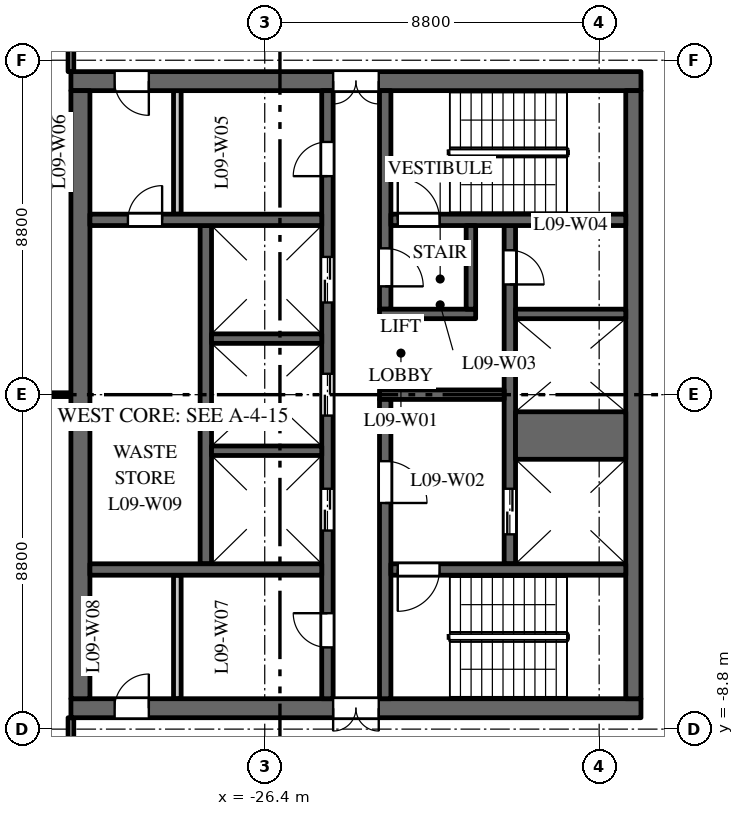
"""IFC4 building model, lengths in metres.
Left out: names, types, materials, properties, quantities, classifications, styles, units other than length and angle.
Written with IfcOpenShell. Run it as: python <this file> out.ifc"""

import sys

from ifc_helpers import new_model, si_unit, direction, frame, frame_2d, origin, place, context, subcontext, project, spatial, rectangle, extrude, element, fill, save


model = new_model("IFC4")
c1 = context("Model", 3, precision=1e-05, world=origin(), true_north=direction((0.0, 1.0)))
c2 = subcontext(c1, "Body", "Model", "MODEL_VIEW")
j1 = project(units=[si_unit("LENGTHUNIT", "METRE"), si_unit("PLANEANGLEUNIT", "RADIAN")], contexts=[c1])
p1 = place(None, origin())
s1 = spatial("IfcSite", under=j1, at=p1, CompositionType="ELEMENT")
p2 = place(p1, origin())
s2 = spatial("IfcBuilding", under=s1, at=p2, CompositionType="ELEMENT")
p3 = place(p2, frame((0.0, 0.0, 46.5)))
s3 = spatial("IfcBuildingStorey", under=s2, at=p3, CompositionType="ELEMENT", Elevation=46.5)
p4 = place(p3, frame((-16.5, 8.25, 0.0), z_axis=(0.0, 0.0, 1.0), x_axis=(-1.0, 0.0, 0.0)))
e1 = element("IfcWall", 1, at=p4, inside=s3, PredefinedType="SHEAR", context=c2, shape_type="SweptSolid", body=[
    extrude(rectangle(XDim=15.0, YDim=0.5, at=frame_2d((7.5, 0.0))), origin(), (0.0, 0.0, 1.0), 3.7),
])
p5 = place(p4, frame((6.9, 0.0, 0.0)))
e2 = element("IfcOpeningElement", 2, at=p5, cuts=e1, PredefinedType="OPENING", context=c2, shape_type="SweptSolid", body=[
    extrude(rectangle(XDim=1.2, YDim=2.1, at=frame_2d((0.6, 1.05))), frame((0.0, 0.26, 0.0), z_axis=(0.0, -1.0, 0.0), x_axis=(1.0, 0.0, 0.0)), (0.0, 0.0, 1.0), 0.52),
])
p6 = place(p4, frame((12.95, 0.0, 0.0)))
e3 = element("IfcOpeningElement", 3, at=p6, cuts=e1, PredefinedType="OPENING", context=c2, shape_type="SweptSolid", body=[
    extrude(rectangle(XDim=0.9, YDim=2.1, at=frame_2d((0.45, 1.05))), frame((0.0, 0.26, 0.0), z_axis=(0.0, -1.0, 0.0), x_axis=(1.0, 0.0, 0.0)), (0.0, 0.0, 1.0), 0.52),
])
p7 = place(p3, frame((-16.5, -8.25, 0.0), z_axis=(0.0, 0.0, 1.0), x_axis=(-1.0, 0.0, 0.0)))
e4 = element("IfcWall", 4, at=p7, inside=s3, PredefinedType="SHEAR", context=c2, shape_type="SweptSolid", body=[
    extrude(rectangle(XDim=15.0, YDim=0.5, at=frame_2d((7.5, 0.0))), origin(), (0.0, 0.0, 1.0), 3.7),
])
p8 = place(p7, frame((6.9, 0.0, 0.0)))
e5 = element("IfcOpeningElement", 5, at=p8, cuts=e4, PredefinedType="OPENING", context=c2, shape_type="SweptSolid", body=[
    extrude(rectangle(XDim=1.2, YDim=2.1, at=frame_2d((0.6, 1.05))), frame((0.0, 0.26, 0.0), z_axis=(0.0, -1.0, 0.0), x_axis=(1.0, 0.0, 0.0)), (0.0, 0.0, 1.0), 0.52),
])
p9 = place(p7, frame((12.95, 0.0, 0.0)))
e6 = element("IfcOpeningElement", 6, at=p9, cuts=e4, PredefinedType="OPENING", context=c2, shape_type="SweptSolid", body=[
    extrude(rectangle(XDim=0.9, YDim=2.1, at=frame_2d((0.45, 1.05))), frame((0.0, 0.26, 0.0), z_axis=(0.0, -1.0, 0.0), x_axis=(1.0, 0.0, 0.0)), (0.0, 0.0, 1.0), 0.52),
])
p10 = place(p3, frame((-27.95, -4.45, 0.0), z_axis=(0.0, 0.0, 1.0), x_axis=(0.0, 1.0, 0.0)))
e7 = element("IfcWall", 7, at=p10, inside=s3, PredefinedType="SHEAR", context=c2, shape_type="SweptSolid", body=[
    extrude(rectangle(XDim=8.9, YDim=0.3, at=frame_2d((4.45, 0.0))), origin(), (0.0, 0.0, 1.0), 3.7),
])
p11 = place(p3, frame((-19.95, -4.45, 0.0), z_axis=(0.0, 0.0, 1.0), x_axis=(0.0, 1.0, 0.0)))
e8 = element("IfcWall", 8, at=p11, inside=s3, PredefinedType="SHEAR", context=c2, shape_type="SweptSolid", body=[
    extrude(rectangle(XDim=8.9, YDim=0.3, at=frame_2d((4.45, 0.0))), origin(), (0.0, 0.0, 1.0), 3.7),
])
p12 = place(p11, frame((0.775, 0.0, 0.0)))
e9 = element("IfcOpeningElement", 9, at=p12, cuts=e8, PredefinedType="OPENING", context=c2, shape_type="SweptSolid", body=[
    extrude(rectangle(XDim=1.2, YDim=2.1, at=frame_2d((0.6, 1.05))), frame((0.0, 0.16, 0.0), z_axis=(0.0, -1.0, 0.0), x_axis=(1.0, 0.0, 0.0)), (0.0, 0.0, 1.0), 0.32),
])
p13 = place(p11, frame((7.35, 0.0, 0.0)))
e10 = element("IfcOpeningElement", 10, at=p13, cuts=e8, PredefinedType="OPENING", context=c2, shape_type="SweptSolid", body=[
    extrude(rectangle(XDim=0.9, YDim=2.1, at=frame_2d((0.45, 1.05))), frame((0.0, 0.16, 0.0), z_axis=(0.0, -1.0, 0.0), x_axis=(1.0, 0.0, 0.0)), (0.0, 0.0, 1.0), 0.32),
])
p14 = place(p3, frame((-24.75, -8.0, 0.0), z_axis=(0.0, 0.0, 1.0), x_axis=(0.0, 1.0, 0.0)))
e11 = element("IfcWall", 11, at=p14, inside=s3, PredefinedType="SHEAR", context=c2, shape_type="SweptSolid", body=[
    extrude(rectangle(XDim=16.0, YDim=0.3, at=frame_2d((8.0, 0.0))), origin(), (0.0, 0.0, 1.0), 3.7),
])
p15 = place(p14, frame((4.425, 0.0, 0.0)))
e12 = element("IfcOpeningElement", 12, at=p15, cuts=e11, PredefinedType="OPENING", context=c2, shape_type="SweptSolid", body=[
    extrude(rectangle(XDim=1.1, YDim=2.1, at=frame_2d((0.55, 1.05))), frame((0.0, 0.16, 0.0), z_axis=(0.0, -1.0, 0.0), x_axis=(1.0, 0.0, 0.0)), (0.0, 0.0, 1.0), 0.32),
])
p16 = place(p14, frame((7.45, 0.0, 0.0)))
e13 = element("IfcOpeningElement", 13, at=p16, cuts=e11, PredefinedType="OPENING", context=c2, shape_type="SweptSolid", body=[
    extrude(rectangle(XDim=1.1, YDim=2.1, at=frame_2d((0.55, 1.05))), frame((0.0, 0.16, 0.0), z_axis=(0.0, -1.0, 0.0), x_axis=(1.0, 0.0, 0.0)), (0.0, 0.0, 1.0), 0.32),
])
p17 = place(p14, frame((10.425, 0.0, 0.0)))
e14 = element("IfcOpeningElement", 14, at=p17, cuts=e11, PredefinedType="OPENING", context=c2, shape_type="SweptSolid", body=[
    extrude(rectangle(XDim=1.2, YDim=2.1, at=frame_2d((0.6, 1.05))), frame((0.0, 0.16, 0.0), z_axis=(0.0, -1.0, 0.0), x_axis=(1.0, 0.0, 0.0)), (0.0, 0.0, 1.0), 0.32),
])
p18 = place(p14, frame((13.75, 0.0, 0.0)))
e15 = element("IfcOpeningElement", 15, at=p18, cuts=e11, PredefinedType="OPENING", context=c2, shape_type="SweptSolid", body=[
    extrude(rectangle(XDim=0.9, YDim=2.1, at=frame_2d((0.45, 1.05))), frame((0.0, 0.16, 0.0), z_axis=(0.0, -1.0, 0.0), x_axis=(1.0, 0.0, 0.0)), (0.0, 0.0, 1.0), 0.32),
])
p19 = place(p14, frame((1.35, 0.0, 0.0)))
e16 = element("IfcOpeningElement", 16, at=p19, cuts=e11, PredefinedType="OPENING", context=c2, shape_type="SweptSolid", body=[
    extrude(rectangle(XDim=0.9, YDim=2.1, at=frame_2d((0.45, 1.05))), frame((0.0, 0.16, 0.0), z_axis=(0.0, -1.0, 0.0), x_axis=(1.0, 0.0, 0.0)), (0.0, 0.0, 1.0), 0.32),
])
p20 = place(p3, frame((-20.1, 0.0, 0.0), z_axis=(0.0, 0.0, 1.0), x_axis=(-1.0, 0.0, 0.0)))
e17 = element("IfcWall", 17, at=p20, inside=s3, PredefinedType="SHEAR", context=c2, shape_type="SweptSolid", body=[
    extrude(rectangle(XDim=3.28, YDim=0.25, at=frame_2d((1.64, 0.0))), origin(), (0.0, 0.0, 1.0), 3.7),
])
p21 = place(p3, frame((-16.7, -8.0, 0.0), z_axis=(0.0, 0.0, 1.0), x_axis=(0.0, 1.0, 0.0)))
e18 = element("IfcWall", 18, at=p21, inside=s3, PredefinedType="SHEAR", context=c2, shape_type="SweptSolid", body=[
    extrude(rectangle(XDim=16.0, YDim=0.4, at=frame_2d((8.0, 0.0))), origin(), (0.0, 0.0, 1.0), 3.7),
])
p22 = place(p3, frame((-31.25, -8.0, 0.0), z_axis=(0.0, 0.0, 1.0), x_axis=(0.0, 1.0, 0.0)))
e19 = element("IfcWall", 19, at=p22, inside=s3, PredefinedType="SHEAR", context=c2, shape_type="SweptSolid", body=[
    extrude(rectangle(XDim=16.0, YDim=0.5, at=frame_2d((8.0, 0.0))), origin(), (0.0, 0.0, 1.0), 3.7),
])
p23 = place(p3, frame((-24.9, 4.6, 0.0), z_axis=(0.0, 0.0, 1.0), x_axis=(-1.0, 0.0, 0.0)))
e20 = element("IfcWall", 20, at=p23, inside=s3, PredefinedType="SHEAR", context=c2, shape_type="SweptSolid", body=[
    extrude(rectangle(XDim=6.1, YDim=0.3, at=frame_2d((3.05, 0.0))), origin(), (0.0, 0.0, 1.0), 3.7),
])
p24 = place(p23, frame((4.2, 0.0, 0.0)))
e21 = element("IfcOpeningElement", 21, at=p24, cuts=e20, PredefinedType="OPENING", context=c2, shape_type="SweptSolid", body=[
    extrude(rectangle(XDim=0.9, YDim=2.1, at=frame_2d((0.45, 1.05))), frame((0.0, 0.16, 0.0), z_axis=(0.0, -1.0, 0.0), x_axis=(1.0, 0.0, 0.0)), (0.0, 0.0, 1.0), 0.32),
])
for number, where, z_axis, x_axis in (
    (22, (-28.7, 4.75, 0.0), (0.0, 0.0, 1.0), (0.0, 1.0, 0.0)),
    (23, (-28.7, -8.0, 0.0), (0.0, 0.0, 1.0), (0.0, 1.0, 0.0)),
):
    element("IfcWall", number, at=place(p3, frame(where, z_axis=z_axis, x_axis=x_axis)), inside=s3, PredefinedType="PARTITIONING", context=c2, shape_type="SweptSolid", body=[
        extrude(rectangle(XDim=3.25, YDim=0.2, at=frame_2d((1.625, 0.0))), origin(), (0.0, 0.0, 1.0), 3.7),
    ])
p25 = place(p3, frame((-24.9, -4.6, 0.0), z_axis=(0.0, 0.0, 1.0), x_axis=(-1.0, 0.0, 0.0)))
e24 = element("IfcWall", 24, at=p25, inside=s3, PredefinedType="SHEAR", context=c2, shape_type="SweptSolid", body=[
    extrude(rectangle(XDim=6.1, YDim=0.3, at=frame_2d((3.05, 0.0))), origin(), (0.0, 0.0, 1.0), 3.7),
])
p26 = place(p3, frame((-16.9, -1.075, 0.0), z_axis=(0.0, 0.0, 1.0), x_axis=(-1.0, 0.0, 0.0)))
e25 = element("IfcWall", 25, at=p26, inside=s3, PredefinedType="SHEAR", context=c2, shape_type="SweptSolid", body=[
    extrude(rectangle(XDim=2.9, YDim=1.25, at=frame_2d((1.45, 0.0))), origin(), (0.0, 0.0, 1.0), 3.7),
])
for number, where, z_axis, x_axis in (
    (26, (-16.9, 2.125, 0.0), (0.0, 0.0, 1.0), (-1.0, 0.0, 0.0)),
    (27, (-24.9, -1.475, 0.0), (0.0, 0.0, 1.0), (-1.0, 0.0, 0.0)),
    (28, (-24.9, 1.475, 0.0), (0.0, 0.0, 1.0), (-1.0, 0.0, 0.0)),
):
    element("IfcWall", number, at=place(p3, frame(where, z_axis=z_axis, x_axis=x_axis)), inside=s3, PredefinedType="SHEAR", context=c2, shape_type="SweptSolid", body=[
        extrude(rectangle(XDim=2.9, YDim=0.25, at=frame_2d((1.45, 0.0))), origin(), (0.0, 0.0, 1.0), 3.7),
    ])
p27 = place(p3, frame((-23.23, 2.25, 0.0), z_axis=(0.0, 0.0, 1.0), x_axis=(0.0, 1.0, 0.0)))
e29 = element("IfcWall", 29, at=p27, inside=s3, PredefinedType="SHEAR", context=c2, shape_type="SweptSolid", body=[
    extrude(rectangle(XDim=5.75, YDim=0.3, at=frame_2d((2.875, 0.0))), origin(), (0.0, 0.0, 1.0), 3.7),
])
p28 = place(p27, frame((0.6, 0.0, 0.0)))
e30 = element("IfcOpeningElement", 30, at=p28, cuts=e29, PredefinedType="OPENING", context=c2, shape_type="SweptSolid", body=[
    extrude(rectangle(XDim=1.0, YDim=2.1, at=frame_2d((0.5, 1.05))), frame((0.0, 0.16, 0.0), z_axis=(0.0, -1.0, 0.0), x_axis=(1.0, 0.0, 0.0)), (0.0, 0.0, 1.0), 0.32),
])
p29 = place(p3, frame((-23.23, -8.0, 0.0), z_axis=(0.0, 0.0, 1.0), x_axis=(0.0, 1.0, 0.0)))
e31 = element("IfcWall", 31, at=p29, inside=s3, PredefinedType="SHEAR", context=c2, shape_type="SweptSolid", body=[
    extrude(rectangle(XDim=7.875, YDim=0.3, at=frame_2d((3.938, 0.0))), origin(), (0.0, 0.0, 1.0), 3.7),
])
p30 = place(p29, frame((5.15, 0.0, 0.0)))
e32 = element("IfcOpeningElement", 32, at=p30, cuts=e31, PredefinedType="OPENING", context=c2, shape_type="SweptSolid", body=[
    extrude(rectangle(XDim=1.1, YDim=2.1, at=frame_2d((0.55, 1.05))), frame((0.0, 0.16, 0.0), z_axis=(0.0, -1.0, 0.0), x_axis=(1.0, 0.0, 0.0)), (0.0, 0.0, 1.0), 0.32),
])
p31 = place(p3, frame((-16.9, 4.6, 0.0), z_axis=(0.0, 0.0, 1.0), x_axis=(-1.0, 0.0, 0.0)))
e33 = element("IfcWall", 33, at=p31, inside=s3, PredefinedType="SHEAR", context=c2, shape_type="SweptSolid", body=[
    extrude(rectangle(XDim=6.18, YDim=0.3, at=frame_2d((3.09, 0.0))), origin(), (0.0, 0.0, 1.0), 3.7),
])
p32 = place(p31, frame((4.9, 0.0, 0.0)))
e34 = element("IfcOpeningElement", 34, at=p32, cuts=e33, PredefinedType="OPENING", context=c2, shape_type="SweptSolid", body=[
    extrude(rectangle(XDim=1.1, YDim=2.1, at=frame_2d((0.55, 1.05))), frame((0.0, 0.16, 0.0), z_axis=(0.0, -1.0, 0.0), x_axis=(1.0, 0.0, 0.0)), (0.0, 0.0, 1.0), 0.32),
])
p33 = place(p3, frame((-16.9, -4.6, 0.0), z_axis=(0.0, 0.0, 1.0), x_axis=(-1.0, 0.0, 0.0)))
e35 = element("IfcWall", 35, at=p33, inside=s3, PredefinedType="SHEAR", context=c2, shape_type="SweptSolid", body=[
    extrude(rectangle(XDim=6.18, YDim=0.3, at=frame_2d((3.09, 0.0))), origin(), (0.0, 0.0, 1.0), 3.7),
])
p34 = place(p33, frame((4.9, 0.0, 0.0)))
e36 = element("IfcOpeningElement", 36, at=p34, cuts=e35, PredefinedType="OPENING", context=c2, shape_type="SweptSolid", body=[
    extrude(rectangle(XDim=1.1, YDim=2.1, at=frame_2d((0.55, 1.05))), frame((0.0, 0.16, 0.0), z_axis=(0.0, -1.0, 0.0), x_axis=(1.0, 0.0, 0.0)), (0.0, 0.0, 1.0), 0.32),
])
p35 = place(p3, frame((-20.85, 2.125, 0.0), z_axis=(0.0, 0.0, 1.0), x_axis=(-1.0, 0.0, 0.0)))
e37 = element("IfcWall", 37, at=p35, inside=s3, PredefinedType="SHEAR", context=c2, shape_type="SweptSolid", body=[
    extrude(rectangle(XDim=2.53, YDim=0.25, at=frame_2d((1.265, 0.0))), origin(), (0.0, 0.0, 1.0), 3.7),
])
p36 = place(p3, frame((-20.975, 2.25, 0.0), z_axis=(0.0, 0.0, 1.0), x_axis=(0.0, 1.0, 0.0)))
e38 = element("IfcWall", 38, at=p36, inside=s3, PredefinedType="SHEAR", context=c2, shape_type="SweptSolid", body=[
    extrude(rectangle(XDim=2.2, YDim=0.25, at=frame_2d((1.1, 0.0))), origin(), (0.0, 0.0, 1.0), 3.7),
])
p37 = place(p3, frame((-35.949, 0.0, 0.0), z_axis=(0.0, 0.0, 1.0), x_axis=(1.0, 0.0, 0.0)))
e39 = element("IfcWall", 39, at=p37, inside=s3, PredefinedType="PARTITIONING", context=c2, shape_type="SweptSolid", body=[
    extrude(rectangle(XDim=4.449, YDim=0.1, at=frame_2d((2.225, 0.0))), origin(), (0.0, 0.0, 1.0), 2.85),
])
p38 = place(p3, frame((-31.5, -10.7, 0.0), z_axis=(0.0, 0.0, 1.0), x_axis=(0.0, 1.0, 0.0)))
e40 = element("IfcWall", 40, at=p38, inside=s3, PredefinedType="PARTITIONING", context=c2, shape_type="SweptSolid", body=[
    extrude(rectangle(XDim=2.2, YDim=0.15, at=frame_2d((1.1, 0.0))), origin(), (0.0, 0.0, 1.0), 3.7),
])
p39 = place(p38, frame((0.55, 0.0, 0.0)))
e41 = element("IfcOpeningElement", 41, at=p39, cuts=e40, PredefinedType="OPENING", context=c2, shape_type="SweptSolid", body=[
    extrude(rectangle(XDim=1.0, YDim=2.1, at=frame_2d((0.5, 1.05))), frame((0.0, 0.085, 0.0), z_axis=(0.0, -1.0, 0.0), x_axis=(1.0, 0.0, 0.0)), (0.0, 0.0, 1.0), 0.17),
])
p40 = place(p3, frame((-31.5, 8.5, 0.0), z_axis=(0.0, 0.0, 1.0), x_axis=(0.0, 1.0, 0.0)))
e42 = element("IfcWall", 42, at=p40, inside=s3, PredefinedType="PARTITIONING", context=c2, shape_type="SweptSolid", body=[
    extrude(rectangle(XDim=2.2, YDim=0.15, at=frame_2d((1.1, 0.0))), origin(), (0.0, 0.0, 1.0), 3.7),
])
p41 = place(p40, frame((0.55, 0.0, 0.0)))
e43 = element("IfcOpeningElement", 43, at=p41, cuts=e42, PredefinedType="OPENING", context=c2, shape_type="SweptSolid", body=[
    extrude(rectangle(XDim=1.0, YDim=2.1, at=frame_2d((0.5, 1.05))), frame((0.0, 0.085, 0.0), z_axis=(0.0, -1.0, 0.0), x_axis=(1.0, 0.0, 0.0)), (0.0, 0.0, 1.0), 0.17),
])
p42 = place(p12, origin())
e44 = element("IfcDoor", 44, at=p42, inside=s3, OperationType="DOUBLE_DOOR_SLIDING", PredefinedType="DOOR", context=c2, shape_type="SweptSolid", body=[
    extrude(rectangle(XDim=1.2, YDim=2.1, at=frame_2d((0.6, 1.05))), frame((0.0, 0.025, 0.0), z_axis=(0.0, -1.0, 0.0), x_axis=(1.0, 0.0, 0.0)), (0.0, 0.0, 1.0), 0.05),
])
fill(e9, e44)
p43 = place(p15, origin())
e45 = element("IfcDoor", 45, at=p43, inside=s3, OperationType="DOUBLE_DOOR_SLIDING", PredefinedType="DOOR", context=c2, shape_type="SweptSolid", body=[
    extrude(rectangle(XDim=1.1, YDim=2.1, at=frame_2d((0.55, 1.05))), frame((0.0, 0.025, 0.0), z_axis=(0.0, -1.0, 0.0), x_axis=(1.0, 0.0, 0.0)), (0.0, 0.0, 1.0), 0.05),
])
fill(e12, e45)
p44 = place(p16, origin())
e46 = element("IfcDoor", 46, at=p44, inside=s3, OperationType="DOUBLE_DOOR_SLIDING", PredefinedType="DOOR", context=c2, shape_type="SweptSolid", body=[
    extrude(rectangle(XDim=1.1, YDim=2.1, at=frame_2d((0.55, 1.05))), frame((0.0, 0.025, 0.0), z_axis=(0.0, -1.0, 0.0), x_axis=(1.0, 0.0, 0.0)), (0.0, 0.0, 1.0), 0.05),
])
fill(e13, e46)
p45 = place(p17, origin())
e47 = element("IfcDoor", 47, at=p45, inside=s3, OperationType="DOUBLE_DOOR_SLIDING", PredefinedType="DOOR", context=c2, shape_type="SweptSolid", body=[
    extrude(rectangle(XDim=1.2, YDim=2.1, at=frame_2d((0.6, 1.05))), frame((0.0, 0.025, 0.0), z_axis=(0.0, -1.0, 0.0), x_axis=(1.0, 0.0, 0.0)), (0.0, 0.0, 1.0), 0.05),
])
fill(e14, e47)
p46 = place(p32, origin())
e48 = element("IfcDoor", 48, at=p46, inside=s3, OperationType="SINGLE_SWING_RIGHT", PredefinedType="DOOR", context=c2, shape_type="SweptSolid", body=[
    extrude(rectangle(XDim=1.1, YDim=2.1, at=frame_2d((0.55, 1.05))), frame((0.0, 0.025, 0.0), z_axis=(0.0, -1.0, 0.0), x_axis=(1.0, 0.0, 0.0)), (0.0, 0.0, 1.0), 0.05),
])
fill(e34, e48)
p47 = place(p34, origin())
e49 = element("IfcDoor", 49, at=p47, inside=s3, OperationType="SINGLE_SWING_LEFT", PredefinedType="DOOR", context=c2, shape_type="SweptSolid", body=[
    extrude(rectangle(XDim=1.1, YDim=2.1, at=frame_2d((0.55, 1.05))), frame((0.0, 0.025, 0.0), z_axis=(0.0, -1.0, 0.0), x_axis=(1.0, 0.0, 0.0)), (0.0, 0.0, 1.0), 0.05),
])
fill(e36, e49)
p48 = place(p30, origin())
e50 = element("IfcDoor", 50, at=p48, inside=s3, OperationType="SINGLE_SWING_LEFT", PredefinedType="DOOR", context=c2, shape_type="SweptSolid", body=[
    extrude(rectangle(XDim=1.1, YDim=2.1, at=frame_2d((0.55, 1.05))), frame((0.0, 0.025, 0.0), z_axis=(0.0, -1.0, 0.0), x_axis=(1.0, 0.0, 0.0)), (0.0, 0.0, 1.0), 0.05),
])
fill(e32, e50)
p49 = place(p28, origin())
e51 = element("IfcDoor", 51, at=p49, inside=s3, OperationType="SINGLE_SWING_LEFT", PredefinedType="DOOR", context=c2, shape_type="SweptSolid", body=[
    extrude(rectangle(XDim=1.0, YDim=2.1, at=frame_2d((0.5, 1.05))), frame((0.0, 0.025, 0.0), z_axis=(0.0, -1.0, 0.0), x_axis=(1.0, 0.0, 0.0)), (0.0, 0.0, 1.0), 0.05),
])
fill(e30, e51)
p50 = place(p5, origin())
e52 = element("IfcDoor", 52, at=p50, inside=s3, OperationType="DOUBLE_DOOR_DOUBLE_SWING", PredefinedType="DOOR", context=c2, shape_type="SweptSolid", body=[
    extrude(rectangle(XDim=1.2, YDim=2.1, at=frame_2d((0.6, 1.05))), frame((0.0, 0.025, 0.0), z_axis=(0.0, -1.0, 0.0), x_axis=(1.0, 0.0, 0.0)), (0.0, 0.0, 1.0), 0.05),
])
fill(e2, e52)
p51 = place(p8, origin())
e53 = element("IfcDoor", 53, at=p51, inside=s3, OperationType="DOUBLE_DOOR_DOUBLE_SWING", PredefinedType="DOOR", context=c2, shape_type="SweptSolid", body=[
    extrude(rectangle(XDim=1.2, YDim=2.1, at=frame_2d((0.6, 1.05))), frame((0.0, 0.025, 0.0), z_axis=(0.0, -1.0, 0.0), x_axis=(1.0, 0.0, 0.0)), (0.0, 0.0, 1.0), 0.05),
])
fill(e5, e53)
p52 = place(p13, origin())
e54 = element("IfcDoor", 54, at=p52, inside=s3, OperationType="SINGLE_SWING_LEFT", PredefinedType="DOOR", context=c2, shape_type="SweptSolid", body=[
    extrude(rectangle(XDim=0.9, YDim=2.1, at=frame_2d((0.45, 1.05))), frame((0.0, 0.025, 0.0), z_axis=(0.0, -1.0, 0.0), x_axis=(1.0, 0.0, 0.0)), (0.0, 0.0, 1.0), 0.05),
])
fill(e10, e54)
p53 = place(p18, origin())
e55 = element("IfcDoor", 55, at=p53, inside=s3, OperationType="SINGLE_SWING_RIGHT", PredefinedType="DOOR", context=c2, shape_type="SweptSolid", body=[
    extrude(rectangle(XDim=0.9, YDim=2.1, at=frame_2d((0.45, 1.05))), frame((0.0, 0.025, 0.0), z_axis=(0.0, -1.0, 0.0), x_axis=(1.0, 0.0, 0.0)), (0.0, 0.0, 1.0), 0.05),
])
fill(e15, e55)
p54 = place(p6, origin())
e56 = element("IfcDoor", 56, at=p54, inside=s3, OperationType="SINGLE_SWING_RIGHT", PredefinedType="DOOR", context=c2, shape_type="SweptSolid", body=[
    extrude(rectangle(XDim=0.9, YDim=2.1, at=frame_2d((0.45, 1.05))), frame((0.0, 0.025, 0.0), z_axis=(0.0, -1.0, 0.0), x_axis=(1.0, 0.0, 0.0)), (0.0, 0.0, 1.0), 0.05),
])
fill(e3, e56)
p55 = place(p19, origin())
e57 = element("IfcDoor", 57, at=p55, inside=s3, OperationType="SINGLE_SWING_LEFT", PredefinedType="DOOR", context=c2, shape_type="SweptSolid", body=[
    extrude(rectangle(XDim=0.9, YDim=2.1, at=frame_2d((0.45, 1.05))), frame((0.0, 0.025, 0.0), z_axis=(0.0, -1.0, 0.0), x_axis=(1.0, 0.0, 0.0)), (0.0, 0.0, 1.0), 0.05),
])
fill(e16, e57)
p56 = place(p9, origin())
e58 = element("IfcDoor", 58, at=p56, inside=s3, OperationType="SINGLE_SWING_LEFT", PredefinedType="DOOR", context=c2, shape_type="SweptSolid", body=[
    extrude(rectangle(XDim=0.9, YDim=2.1, at=frame_2d((0.45, 1.05))), frame((0.0, 0.025, 0.0), z_axis=(0.0, -1.0, 0.0), x_axis=(1.0, 0.0, 0.0)), (0.0, 0.0, 1.0), 0.05),
])
fill(e6, e58)
p57 = place(p24, origin())
e59 = element("IfcDoor", 59, at=p57, inside=s3, OperationType="SINGLE_SWING_LEFT", PredefinedType="DOOR", context=c2, shape_type="SweptSolid", body=[
    extrude(rectangle(XDim=0.9, YDim=2.1, at=frame_2d((0.45, 1.05))), frame((0.0, 0.025, 0.0), z_axis=(0.0, -1.0, 0.0), x_axis=(1.0, 0.0, 0.0)), (0.0, 0.0, 1.0), 0.05),
])
fill(e21, e59)
save(model, sys.argv[1])
